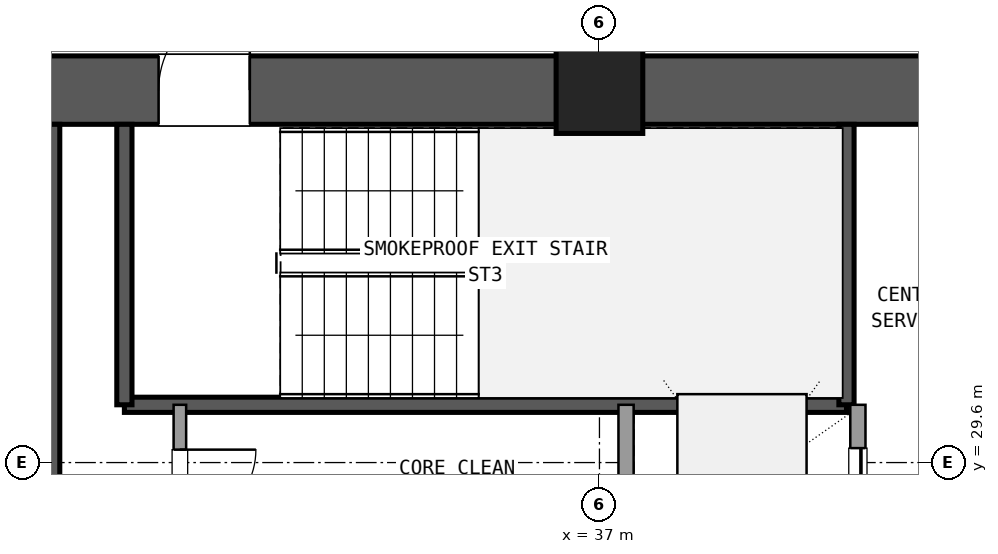
"""IFC4 building model, lengths in metres.
Left out: names, types, materials, properties, quantities, classifications, styles, units other than length and angle.
Written with IfcOpenShell. Run it as: python <this file> out.ifc"""

import sys

from ifc_helpers import new_model, si_unit, direction, frame, frame_2d, origin, origin_2d, place, context, subcontext, project, spatial, rectangle, extrude, element, fill, save


model = new_model("IFC4")
c1 = context("Model", 3, precision=1e-05, world=origin(), true_north=direction((0.0, 1.0)))
c2 = subcontext(c1, "Body", "Model", "MODEL_VIEW")
j1 = project(units=[si_unit("LENGTHUNIT", "METRE"), si_unit("PLANEANGLEUNIT", "RADIAN")], contexts=[c1])
p1 = place(None, origin())
s1 = spatial("IfcSite", under=j1, at=p1, CompositionType="ELEMENT")
p2 = place(p1, origin())
s2 = spatial("IfcBuilding", under=s1, at=p2, CompositionType="ELEMENT")
p3 = place(p2, frame((0.0, 0.0, 67.14)))
s3 = spatial("IfcBuildingStorey", under=s2, at=p3, CompositionType="ELEMENT", Elevation=67.14)
p4 = place(p3, frame((37.0, 34.5, 0.0), z_axis=(0.0, 0.0, 1.0), x_axis=(1.0, 0.0, 0.0)))
e1 = element("IfcColumn", 1, at=p4, inside=s3, PredefinedType="COLUMN", context=c2, shape_type="SweptSolid", body=[
    extrude(rectangle(XDim=1.14, YDim=1.14, at=origin_2d()), origin(), (0.0, 0.0, 1.0), 3.6),
])
p5 = place(p3, frame((47.635, 34.5, 0.0), z_axis=(0.0, 0.0, 1.0), x_axis=(-1.0, 0.0, 0.0)))
e2 = element("IfcWall", 2, at=p5, inside=s3, PredefinedType="SHEAR", context=c2, shape_type="SweptSolid", body=[
    extrude(rectangle(XDim=10.07, YDim=0.9, at=frame_2d((5.035, 0.0))), origin(), (0.0, 0.0, 1.0), 3.3),
])
p6 = place(p5, frame((4.535, 0.0, 0.0)))
e3 = element("IfcOpeningElement", 3, at=p6, cuts=e2, PredefinedType="OPENING", context=c2, shape_type="SweptSolid", body=[
    extrude(rectangle(XDim=1.6, YDim=2.2, at=frame_2d((0.8, 1.1))), frame((0.0, 0.46, 0.0), z_axis=(0.0, -1.0, 0.0), x_axis=(1.0, 0.0, 0.0)), (0.0, 0.0, 1.0), 0.92),
])
p7 = place(p3, frame((36.435, 34.5, 0.0), z_axis=(0.0, 0.0, 1.0), x_axis=(-1.0, 0.0, 0.0)))
e4 = element("IfcWall", 4, at=p7, inside=s3, PredefinedType="SHEAR", context=c2, shape_type="SweptSolid", body=[
    extrude(rectangle(XDim=10.07, YDim=0.9, at=frame_2d((5.035, 0.0))), origin(), (0.0, 0.0, 1.0), 3.3),
])
p8 = place(p7, frame((4.035, 0.0, 0.0)))
e5 = element("IfcOpeningElement", 5, at=p8, cuts=e4, PredefinedType="OPENING", context=c2, shape_type="SweptSolid", body=[
    extrude(rectangle(XDim=1.2, YDim=2.15, at=frame_2d((0.6, 1.075))), frame((0.0, 0.46, 0.0), z_axis=(0.0, -1.0, 0.0), x_axis=(1.0, 0.0, 0.0)), (0.0, 0.0, 1.0), 0.92),
])
p9 = place(p3, frame((29.8, 24.65, 0.0), z_axis=(0.0, 0.0, 1.0), x_axis=(0.0, 1.0, 0.0)))
e6 = element("IfcWall", 6, at=p9, inside=s3, PredefinedType="SHEAR", context=c2, shape_type="SweptSolid", body=[
    extrude(rectangle(XDim=9.4, YDim=0.2, at=frame_2d((4.7, 0.0))), origin(), (0.0, 0.0, 1.0), 3.3),
])
p10 = place(p3, frame((30.75, 30.36, 0.0), z_axis=(0.0, 0.0, 1.0), x_axis=(1.0, 0.0, 0.0)))
e7 = element("IfcWall", 7, at=p10, inside=s3, PredefinedType="SHEAR", context=c2, shape_type="SweptSolid", body=[
    extrude(rectangle(XDim=9.5, YDim=0.2, at=frame_2d((4.75, 0.0))), origin(), (0.0, 0.0, 1.0), 3.3),
])
for number, where, z_axis, x_axis in (
    (8, (30.75, 30.36, 0.0), (0.0, 0.0, 1.0), (0.0, 1.0, 0.0)),
    (9, (40.25, 30.36, 0.0), (0.0, 0.0, 1.0), (0.0, 1.0, 0.0)),
):
    element("IfcWall", number, at=place(p3, frame(where, z_axis=z_axis, x_axis=x_axis)), inside=s3, PredefinedType="SHEAR", context=c2, shape_type="SweptSolid", body=[
        extrude(rectangle(XDim=3.69, YDim=0.2, at=frame_2d((1.845, 0.0))), origin(), (0.0, 0.0, 1.0), 3.3),
    ])
p11 = place(p3, frame((37.35, 23.54, 0.0), z_axis=(0.0, 0.0, 1.0), x_axis=(0.0, 1.0, 0.0)))
e10 = element("IfcWall", 10, at=p11, inside=s3, PredefinedType="SOLIDWALL", context=c2, shape_type="SweptSolid", body=[
    extrude(rectangle(XDim=6.82, YDim=0.2, at=frame_2d((3.41, 0.0))), origin(), (0.0, 0.0, 1.0), 2.59),
])
p12 = place(p3, frame((40.4, 23.54, 0.0), z_axis=(0.0, 0.0, 1.0), x_axis=(0.0, 1.0, 0.0)))
e11 = element("IfcWall", 11, at=p12, inside=s3, PredefinedType="SOLIDWALL", context=c2, shape_type="SweptSolid", body=[
    extrude(rectangle(XDim=6.82, YDim=0.2, at=frame_2d((3.41, 0.0))), origin(), (0.0, 0.0, 1.0), 2.59),
])
p13 = place(p12, frame((0.35, 0.0, 0.0)))
e12 = element("IfcOpeningElement", 12, at=p13, cuts=e11, PredefinedType="OPENING", context=c2, shape_type="SweptSolid", body=[
    extrude(rectangle(XDim=1.4, YDim=2.2, at=frame_2d((0.7, 1.1))), frame((0.0, 0.11, 0.0), z_axis=(0.0, -1.0, 0.0), x_axis=(1.0, 0.0, 0.0)), (0.0, 0.0, 1.0), 0.22),
])
p14 = place(p12, frame((2.65, 0.0, 0.0)))
e13 = element("IfcOpeningElement", 13, at=p14, cuts=e11, PredefinedType="OPENING", context=c2, shape_type="SweptSolid", body=[
    extrude(rectangle(XDim=1.4, YDim=2.2, at=frame_2d((0.7, 1.1))), frame((0.0, 0.11, 0.0), z_axis=(0.0, -1.0, 0.0), x_axis=(1.0, 0.0, 0.0)), (0.0, 0.0, 1.0), 0.22),
])
p15 = place(p12, frame((4.85, 0.0, 0.0)))
e14 = element("IfcOpeningElement", 14, at=p15, cuts=e11, PredefinedType="OPENING", context=c2, shape_type="SweptSolid", body=[
    extrude(rectangle(XDim=1.4, YDim=2.2, at=frame_2d((0.7, 1.1))), frame((0.0, 0.11, 0.0), z_axis=(0.0, -1.0, 0.0), x_axis=(1.0, 0.0, 0.0)), (0.0, 0.0, 1.0), 0.22),
])
p16 = place(p3, frame((31.48, 26.32, 0.0), z_axis=(0.0, 0.0, 1.0), x_axis=(0.0, 1.0, 0.0)))
e15 = element("IfcWall", 15, at=p16, inside=s3, PredefinedType="PLUMBINGWALL", context=c2, shape_type="SweptSolid", body=[
    extrude(rectangle(XDim=4.04, YDim=0.165, at=frame_2d((2.02, 0.0))), origin(), (0.0, 0.0, 1.0), 2.59),
])
p17 = place(p16, frame((0.5, 0.0, 0.0)))
e16 = element("IfcOpeningElement", 16, at=p17, cuts=e15, PredefinedType="OPENING", context=c2, shape_type="SweptSolid", body=[
    extrude(rectangle(XDim=0.95, YDim=2.1, at=frame_2d((0.475, 1.05))), frame((0.0, 0.093, 0.0), z_axis=(0.0, -1.0, 0.0), x_axis=(1.0, 0.0, 0.0)), (0.0, 0.0, 1.0), 0.185),
])
p18 = place(p16, frame((2.45, 0.0, 0.0)))
e17 = element("IfcOpeningElement", 17, at=p18, cuts=e15, PredefinedType="OPENING", context=c2, shape_type="SweptSolid", body=[
    extrude(rectangle(XDim=1.0, YDim=2.15, at=frame_2d((0.5, 1.075))), frame((0.0, 0.093, 0.0), z_axis=(0.0, -1.0, 0.0), x_axis=(1.0, 0.0, 0.0)), (0.0, 0.0, 1.0), 0.185),
])
p19 = place(p3, frame((37.0, 34.95, 0.0), z_axis=(0.0, 0.0, 1.0), x_axis=(0.0, 1.0, 0.0)))
e18 = element("IfcWall", 18, at=p19, inside=s3, PredefinedType="PARTITIONING", context=c2, shape_type="SweptSolid", body=[
    extrude(rectangle(XDim=2.7, YDim=0.18, at=frame_2d((1.35, 0.0))), origin(), (0.0, 0.0, 1.0), 2.59),
])
p20 = place(p19, frame((0.35, 0.0, 0.0)))
e19 = element("IfcOpeningElement", 19, at=p20, cuts=e18, PredefinedType="OPENING", context=c2, shape_type="SweptSolid", body=[
    extrude(rectangle(XDim=2.0, YDim=2.2, at=frame_2d((1.0, 1.1))), frame((0.0, 0.1, 0.0), z_axis=(0.0, -1.0, 0.0), x_axis=(1.0, 0.0, 0.0)), (0.0, 0.0, 1.0), 0.2),
])
p21 = place(p8, frame((1.2, 0.0, 0.0), z_axis=(0.0, 0.0, 1.0), x_axis=(-1.0, 0.0, 0.0)))
e20 = element("IfcDoor", 20, at=p21, inside=s3, OperationType="SINGLE_SWING_LEFT", PredefinedType="DOOR", context=c2, shape_type="SweptSolid", body=[
    extrude(rectangle(XDim=1.2, YDim=2.15, at=frame_2d((0.6, 1.075))), frame((0.0, 0.025, 0.0), z_axis=(0.0, -1.0, 0.0), x_axis=(1.0, 0.0, 0.0)), (0.0, 0.0, 1.0), 0.05),
])
fill(e5, e20)
p22 = place(p15, origin())
e21 = element("IfcDoor", 21, at=p22, inside=s3, OperationType="SLIDING_TO_RIGHT", PredefinedType="DOOR", context=c2, shape_type="SweptSolid", body=[
    extrude(rectangle(XDim=1.4, YDim=2.2, at=frame_2d((0.7, 1.1))), frame((0.0, 0.025, 0.0), z_axis=(0.0, -1.0, 0.0), x_axis=(1.0, 0.0, 0.0)), (0.0, 0.0, 1.0), 0.05),
])
fill(e14, e21)
p23 = place(p18, frame((1.0, 0.0, 0.0), z_axis=(0.0, 0.0, 1.0), x_axis=(-1.0, 0.0, 0.0)))
e22 = element("IfcDoor", 22, at=p23, inside=s3, OperationType="SINGLE_SWING_RIGHT", PredefinedType="DOOR", context=c2, shape_type="SweptSolid", body=[
    extrude(rectangle(XDim=1.0, YDim=2.15, at=frame_2d((0.5, 1.075))), frame((0.0, 0.025, 0.0), z_axis=(0.0, -1.0, 0.0), x_axis=(1.0, 0.0, 0.0)), (0.0, 0.0, 1.0), 0.05),
])
fill(e17, e22)
save(model, sys.argv[1])
